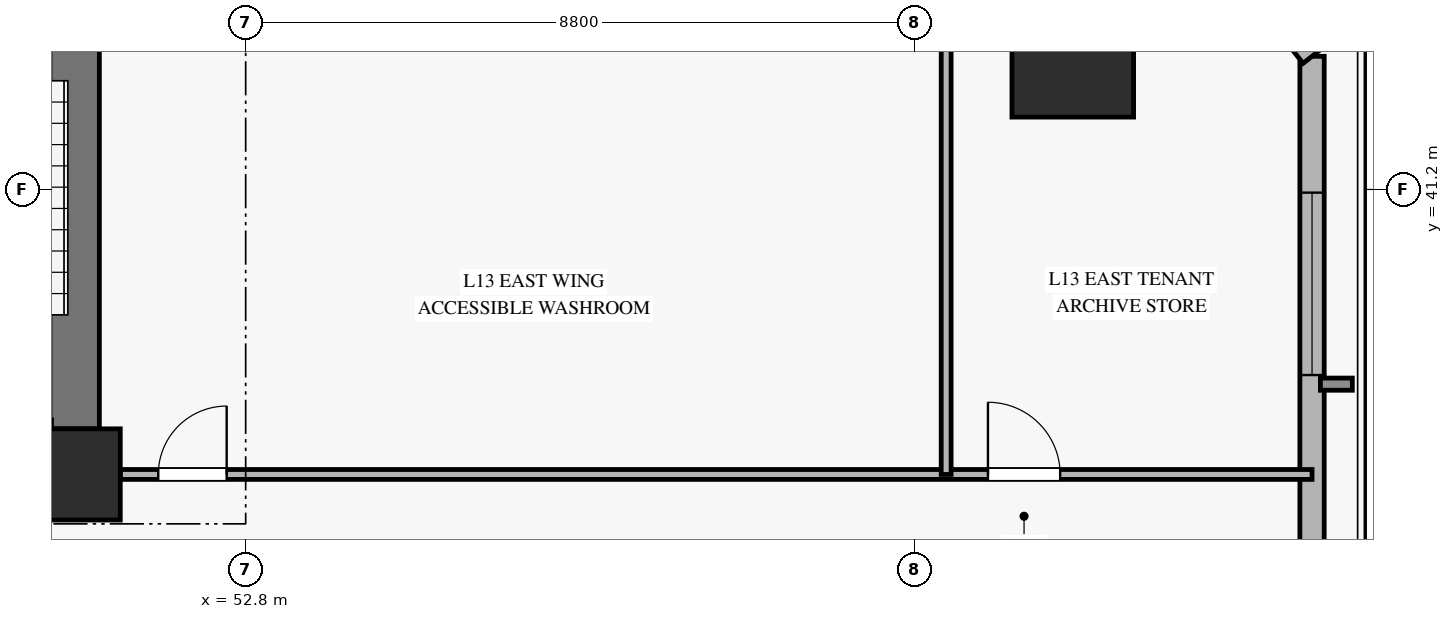
"""IFC4 building model, lengths in metres.
Left out: names, types, materials, properties, quantities, classifications, styles, units other than length and angle.
Written with IfcOpenShell. Run it as: python <this file> out.ifc"""

import sys

from ifc_helpers import new_model, si_unit, direction, frame, frame_2d, origin, origin_2d, place, context, subcontext, project, spatial, rectangle, hollow_rectangle, extrude, source, transform, mapped, element, fill, save


model = new_model("IFC4")
c1 = context("Model", 3, precision=1e-05, world=origin(), true_north=direction((0.0, 1.0)))
c2 = subcontext(c1, "Body", "Model", "MODEL_VIEW")
j1 = project(units=[si_unit("LENGTHUNIT", "METRE"), si_unit("PLANEANGLEUNIT", "RADIAN")], contexts=[c1])
p1 = place(None, origin())
s1 = spatial("IfcSite", under=j1, at=p1, CompositionType="ELEMENT")
p2 = place(p1, origin())
s2 = spatial("IfcBuilding", under=s1, at=p2, CompositionType="ELEMENT")
p3 = place(p2, frame((0.0, 0.0, 53.3)))
s3 = spatial("IfcBuildingStorey", under=s2, at=p3, CompositionType="ELEMENT", Elevation=53.3)
m1 = source(origin(), c2, "Body", "SweptSolid", [
    extrude(rectangle(XDim=1.2, YDim=1.2, at=origin_2d()), origin(), (0.0, 0.0, 1.0), 3.68),
])
p4 = place(p3, frame((50.55, 37.45, 0.0), z_axis=(0.0, 0.0, 1.0), x_axis=(1.0, 0.0, 0.0)))
e1 = element("IfcColumn", 1, at=p4, inside=s3, PredefinedType="PILASTER", context=c2, shape_type="MappedRepresentation", body=[
    mapped(m1, transform((0.0, 0.0, 0.0), x_axis=(1.0, 0.0, 0.0), y_axis=(0.0, 1.0, 0.0), z_axis=(0.0, 0.0, 1.0), scale=1.0)),
])
p5 = place(p3, frame((50.55, 38.05, 0.0), z_axis=(0.0, 0.0, 1.0), x_axis=(0.0, 1.0, 0.0)))
e2 = element("IfcWall", 2, at=p5, inside=s3, PredefinedType="SHEAR", context=c2, shape_type="SweptSolid", body=[
    extrude(rectangle(XDim=7.9, YDim=0.65, at=frame_2d((3.95, 0.0))), origin(), (0.0, 0.0, 1.0), 3.68),
])
m2 = source(origin(), c2, "Body", "SweptSolid", [
    extrude(hollow_rectangle(XDim=1.6, YDim=1.6, WallThickness=0.075, at=origin_2d()), origin(), (0.0, 0.0, 1.0), 3.68),
])
p6 = place(p3, frame((63.682, 42.952, 0.0), z_axis=(0.0, 0.0, 1.0), x_axis=(1.0, 0.0, 0.0)))
e3 = element("IfcColumn", 3, at=p6, inside=s3, PredefinedType="COLUMN", context=c2, shape_type="MappedRepresentation", body=[
    mapped(m2, transform((0.0, 0.0, 0.0), x_axis=(1.0, 0.0, 0.0), y_axis=(0.0, 1.0, 0.0), z_axis=(0.0, 0.0, 1.0), scale=1.0)),
])
p7 = place(p3, frame((66.83, 25.777, 0.0), z_axis=(0.0, 0.0, 1.0), x_axis=(0.0, 1.0, 0.0)))
e4 = element("IfcWall", 4, at=p7, inside=s3, PredefinedType="SOLIDWALL", context=c2, shape_type="SweptSolid", body=[
    extrude(rectangle(XDim=17.175, YDim=0.32, at=frame_2d((8.587, 0.0))), origin(), (0.0, 0.0, 1.0), 3.16),
])
p8 = place(p7, frame((1.225, 0.0, 0.45)))
e5 = element("IfcOpeningElement", 5, at=p8, cuts=e4, PredefinedType="OPENING", context=c2, shape_type="SweptSolid", body=[
    extrude(rectangle(XDim=2.4, YDim=2.1, at=frame_2d((1.2, 1.05))), frame((0.0, 0.17, 0.0), z_axis=(0.0, -1.0, 0.0), x_axis=(1.0, 0.0, 0.0)), (0.0, 0.0, 1.0), 0.34),
])
p9 = place(p7, frame((12.981, 0.0, 0.45)))
e6 = element("IfcOpeningElement", 6, at=p9, cuts=e4, PredefinedType="OPENING", context=c2, shape_type="SweptSolid", body=[
    extrude(rectangle(XDim=2.4, YDim=2.1, at=frame_2d((1.2, 1.05))), frame((0.0, 0.17, 0.0), z_axis=(0.0, -1.0, 0.0), x_axis=(1.0, 0.0, 0.0)), (0.0, 0.0, 1.0), 0.34),
])
p10 = place(p3, frame((66.83, 42.952, 0.0), z_axis=(0.0, 0.0, 1.0), x_axis=(-0.618820039529, 0.785532786507, 0.0)))
e7 = element("IfcWall", 7, at=p10, inside=s3, PredefinedType="SOLIDWALL", context=c2, shape_type="SweptSolid", body=[
    extrude(rectangle(XDim=4.198, YDim=0.3, at=frame_2d((2.099, 0.0))), origin(), (0.0, 0.0, 1.0), 3.16),
])
p11 = place(p10, frame((1.299, 0.0, 0.45)))
e8 = element("IfcOpeningElement", 8, at=p11, cuts=e7, PredefinedType="OPENING", context=c2, shape_type="SweptSolid", body=[
    extrude(rectangle(XDim=1.6, YDim=2.0, at=frame_2d((0.8, 1.0))), frame((0.0, 0.16, 0.0), z_axis=(0.0, -1.0, 0.0), x_axis=(1.0, 0.0, 0.0)), (0.0, 0.0, 1.0), 0.32),
])
p12 = place(p3, frame((51.15, 37.45, 0.0), z_axis=(0.0, 0.0, 1.0), x_axis=(1.0, 0.0, 0.0)))
e9 = element("IfcWall", 9, at=p12, inside=s3, PredefinedType="PARTITIONING", context=c2, shape_type="SweptSolid", body=[
    extrude(rectangle(XDim=15.68, YDim=0.13, at=frame_2d((7.84, 0.0))), origin(), (0.0, 0.0, 1.0), 3.165),
])
p13 = place(p12, frame((0.5, 0.0, 0.0)))
e10 = element("IfcOpeningElement", 10, at=p13, cuts=e9, PredefinedType="OPENING", context=c2, shape_type="SweptSolid", body=[
    extrude(rectangle(XDim=0.9, YDim=2.1, at=frame_2d((0.45, 1.05))), frame((0.0, 0.075, 0.0), z_axis=(0.0, -1.0, 0.0), x_axis=(1.0, 0.0, 0.0)), (0.0, 0.0, 1.0), 0.15),
])
p14 = place(p12, frame((11.416, 0.0, 0.0)))
e11 = element("IfcOpeningElement", 11, at=p14, cuts=e9, PredefinedType="OPENING", context=c2, shape_type="SweptSolid", body=[
    extrude(rectangle(XDim=0.95, YDim=2.1, at=frame_2d((0.475, 1.05))), frame((0.0, 0.075, 0.0), z_axis=(0.0, -1.0, 0.0), x_axis=(1.0, 0.0, 0.0)), (0.0, 0.0, 1.0), 0.15),
])
p15 = place(p3, frame((62.016, 37.45, 0.0), z_axis=(0.0, 0.0, 1.0), x_axis=(0.0, 1.0, 0.0)))
e12 = element("IfcWall", 12, at=p15, inside=s3, PredefinedType="PARTITIONING", context=c2, shape_type="SweptSolid", body=[
    extrude(rectangle(XDim=8.8, YDim=0.13, at=frame_2d((4.4, 0.0))), origin(), (0.0, 0.0, 1.0), 3.68),
])
m3 = source(origin(), c2, "Body", "SweptSolid", [
    extrude(rectangle(XDim=2.4, YDim=2.1, at=frame_2d((1.2, 1.05))), frame((0.0, 0.03, 0.0), z_axis=(0.0, -1.0, 0.0), x_axis=(1.0, 0.0, 0.0)), (0.0, 0.0, 1.0), 0.06),
])
p16 = place(p9, origin())
e13 = element("IfcWindow", 13, at=p16, inside=s3, PartitioningType="SINGLE_PANEL", PredefinedType="WINDOW", context=c2, shape_type="MappedRepresentation", body=[
    mapped(m3, transform((0.0, 0.0, 0.0), x_axis=(1.0, 0.0, 0.0), y_axis=(0.0, 1.0, 0.0), z_axis=(0.0, 0.0, 1.0), scale=1.0)),
])
fill(e6, e13)
m4 = source(origin(), c2, "Body", "SweptSolid", [
    extrude(rectangle(XDim=0.9, YDim=2.1, at=frame_2d((0.45, 1.05))), frame((0.0, 0.025, 0.0), z_axis=(0.0, -1.0, 0.0), x_axis=(1.0, 0.0, 0.0)), (0.0, 0.0, 1.0), 0.05),
])
p17 = place(p13, origin())
e14 = element("IfcDoor", 14, at=p17, inside=s3, OperationType="SINGLE_SWING_RIGHT", PredefinedType="DOOR", context=c2, shape_type="MappedRepresentation", body=[
    mapped(m4, transform((0.0, 0.0, 0.0), x_axis=(1.0, 0.0, 0.0), y_axis=(0.0, 1.0, 0.0), z_axis=(0.0, 0.0, 1.0), scale=1.0)),
])
fill(e10, e14)
m5 = source(origin(), c2, "Body", "SweptSolid", [
    extrude(rectangle(XDim=0.95, YDim=2.1, at=frame_2d((0.475, 1.05))), frame((0.0, 0.025, 0.0), z_axis=(0.0, -1.0, 0.0), x_axis=(1.0, 0.0, 0.0)), (0.0, 0.0, 1.0), 0.05),
])
p18 = place(p14, origin())
e15 = element("IfcDoor", 15, at=p18, inside=s3, OperationType="SINGLE_SWING_LEFT", PredefinedType="DOOR", context=c2, shape_type="MappedRepresentation", body=[
    mapped(m5, transform((0.0, 0.0, 0.0), x_axis=(1.0, 0.0, 0.0), y_axis=(0.0, 1.0, 0.0), z_axis=(0.0, 0.0, 1.0), scale=1.0)),
])
fill(e11, e15)
save(model, sys.argv[1])
